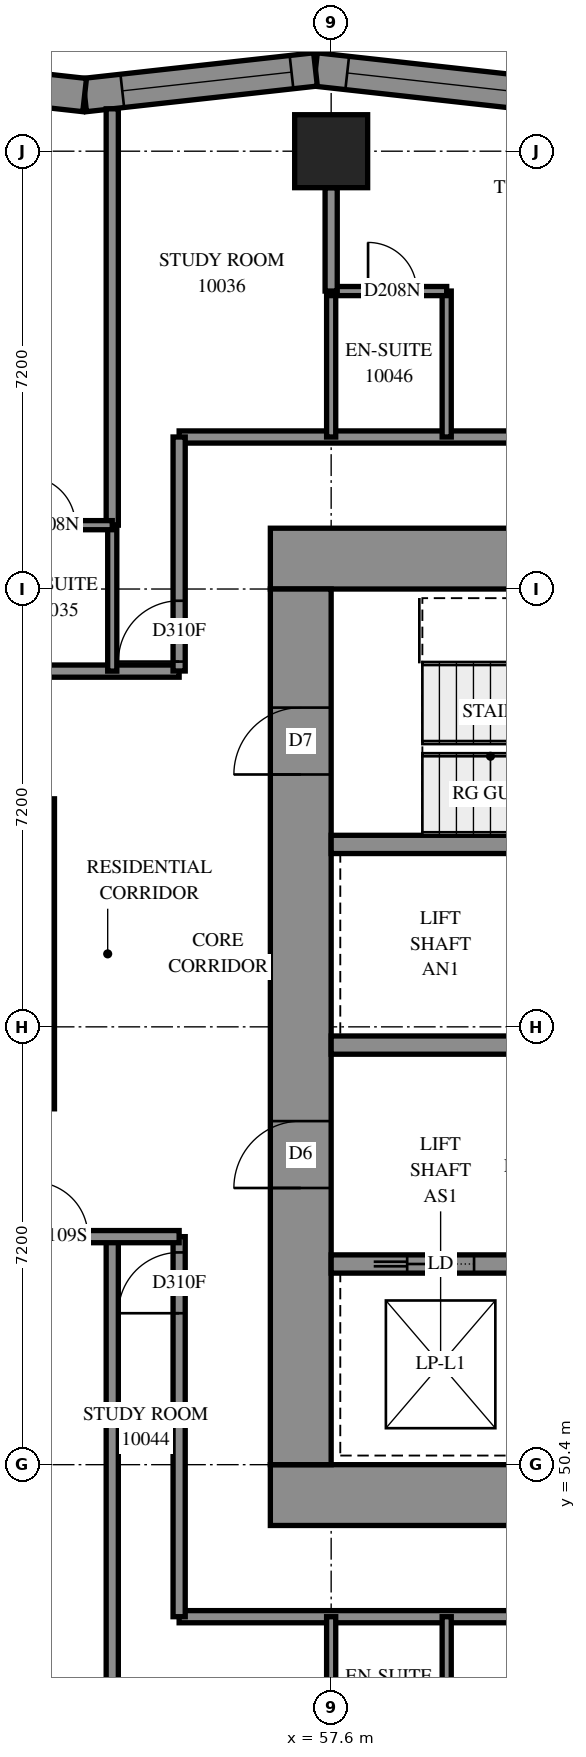
"""IFC4 building model, lengths in metres.
Left out: names, types, materials, properties, quantities, classifications, styles, units other than length and angle.
Written with IfcOpenShell. Run it as: python <this file> out.ifc"""

import sys

from ifc_helpers import new_model, si_unit, direction, frame, frame_2d, origin, origin_2d, place, context, subcontext, project, spatial, polyline, rectangle, outline, extrude, element, fill, save


model = new_model("IFC4")
c1 = context("Model", 3, precision=1e-05, world=origin(), true_north=direction((0.0, 1.0)))
c2 = subcontext(c1, "Body", "Model", "MODEL_VIEW")
j1 = project(units=[si_unit("LENGTHUNIT", "METRE"), si_unit("PLANEANGLEUNIT", "RADIAN")], contexts=[c1])
p1 = place(None, origin())
s1 = spatial("IfcSite", under=j1, at=p1, CompositionType="ELEMENT")
p2 = place(p1, origin())
s2 = spatial("IfcBuilding", under=s1, at=p2, CompositionType="ELEMENT")
p3 = place(p2, frame((0.0, 0.0, 40.6)))
s3 = spatial("IfcBuildingStorey", under=s2, at=p3, CompositionType="ELEMENT", Elevation=40.6)
p4 = place(p3, frame((57.6, 72.0, 0.0), z_axis=(0.0, 0.0, 1.0), x_axis=(1.0, 0.0, 0.0)))
e1 = element("IfcColumn", 1, at=p4, inside=s3, PredefinedType="COLUMN", context=c2, shape_type="SweptSolid", body=[
    extrude(rectangle(XDim=1.2, YDim=1.2, at=origin_2d()), origin(), (0.0, 0.0, 1.0), 3.1),
])
p5 = place(p3, frame((56.6, 49.9, -0.3), z_axis=(0.0, 0.0, 1.0), x_axis=(1.0, 0.0, 0.0)))
e2 = element("IfcWall", 2, at=p5, inside=s3, PredefinedType="SHEAR", context=c2, shape_type="SweptSolid", body=[
    extrude(rectangle(XDim=16.4, YDim=1.0, at=frame_2d((8.2, 0.0))), origin(), (0.0, 0.0, 1.0), 2.7),
])
p6 = place(p3, frame((56.6, 65.3, -0.3), z_axis=(0.0, 0.0, 1.0), x_axis=(1.0, 0.0, 0.0)))
e3 = element("IfcWall", 3, at=p6, inside=s3, PredefinedType="SHEAR", context=c2, shape_type="SweptSolid", body=[
    extrude(rectangle(XDim=16.4, YDim=1.0, at=frame_2d((8.2, 0.0))), origin(), (0.0, 0.0, 1.0), 2.7),
])
p7 = place(p6, frame((11.0, 0.0, 0.3)))
e4 = element("IfcOpeningElement", 4, at=p7, cuts=e3, PredefinedType="OPENING", context=c2, shape_type="SweptSolid", body=[
    extrude(rectangle(XDim=0.8, YDim=2.1, at=frame_2d((0.4, 1.05))), frame((0.0, 0.51, 0.0), z_axis=(0.0, -1.0, 0.0), x_axis=(1.0, 0.0, 0.0)), (0.0, 0.0, 1.0), 1.02),
])
p8 = place(p3, frame((57.1, 50.4, -0.3), z_axis=(0.0, 0.0, 1.0), x_axis=(0.0, 1.0, 0.0)))
e5 = element("IfcWall", 5, at=p8, inside=s3, PredefinedType="SHEAR", context=c2, shape_type="SweptSolid", body=[
    extrude(rectangle(XDim=14.4, YDim=1.0, at=frame_2d((7.2, 0.0))), origin(), (0.0, 0.0, 1.0), 2.7),
])
p9 = place(p8, frame((4.55, 0.0, 0.3)))
e6 = element("IfcOpeningElement", 6, at=p9, cuts=e5, PredefinedType="OPENING", context=c2, shape_type="SweptSolid", body=[
    extrude(rectangle(XDim=1.1, YDim=2.1, at=frame_2d((0.55, 1.05))), frame((0.0, 0.51, 0.0), z_axis=(0.0, -1.0, 0.0), x_axis=(1.0, 0.0, 0.0)), (0.0, 0.0, 1.0), 1.02),
])
p10 = place(p8, frame((11.35, 0.0, 0.3)))
e7 = element("IfcOpeningElement", 7, at=p10, cuts=e5, PredefinedType="OPENING", context=c2, shape_type="SweptSolid", body=[
    extrude(rectangle(XDim=1.1, YDim=2.1, at=frame_2d((0.55, 1.05))), frame((0.0, 0.51, 0.0), z_axis=(0.0, -1.0, 0.0), x_axis=(1.0, 0.0, 0.0)), (0.0, 0.0, 1.0), 1.02),
])
p11 = place(p3, frame((57.6, 53.7, 0.0), z_axis=(0.0, 0.0, 1.0), x_axis=(1.0, 0.0, 0.0)))
e8 = element("IfcWall", 8, at=p11, inside=s3, PredefinedType="SOLIDWALL", context=c2, shape_type="SweptSolid", body=[
    extrude(rectangle(XDim=14.4, YDim=0.3, at=frame_2d((7.2, 0.0))), origin(), (0.0, 0.0, 1.0), 3.1),
])
p12 = place(p11, frame((1.25, 0.0, 0.0)))
e9 = element("IfcOpeningElement", 9, at=p12, cuts=e8, PredefinedType="OPENING", context=c2, shape_type="SweptSolid", body=[
    extrude(rectangle(XDim=1.1, YDim=2.1, at=frame_2d((0.55, 1.05))), frame((0.0, 0.16, 0.0), z_axis=(0.0, -1.0, 0.0), x_axis=(1.0, 0.0, 0.0)), (0.0, 0.0, 1.0), 0.32),
])
p13 = place(p11, frame((4.85, 0.0, 0.0)))
e10 = element("IfcOpeningElement", 10, at=p13, cuts=e8, PredefinedType="OPENING", context=c2, shape_type="SweptSolid", body=[
    extrude(rectangle(XDim=1.1, YDim=2.1, at=frame_2d((0.55, 1.05))), frame((0.0, 0.16, 0.0), z_axis=(0.0, -1.0, 0.0), x_axis=(1.0, 0.0, 0.0)), (0.0, 0.0, 1.0), 0.32),
])
p14 = place(p11, frame((8.45, 0.0, 0.0)))
e11 = element("IfcOpeningElement", 11, at=p14, cuts=e8, PredefinedType="OPENING", context=c2, shape_type="SweptSolid", body=[
    extrude(rectangle(XDim=1.1, YDim=2.1, at=frame_2d((0.55, 1.05))), frame((0.0, 0.16, 0.0), z_axis=(0.0, -1.0, 0.0), x_axis=(1.0, 0.0, 0.0)), (0.0, 0.0, 1.0), 0.32),
])
p15 = place(p11, frame((12.05, 0.0, 0.0)))
e12 = element("IfcOpeningElement", 12, at=p15, cuts=e8, PredefinedType="OPENING", context=c2, shape_type="SweptSolid", body=[
    extrude(rectangle(XDim=1.1, YDim=2.1, at=frame_2d((0.55, 1.05))), frame((0.0, 0.16, 0.0), z_axis=(0.0, -1.0, 0.0), x_axis=(1.0, 0.0, 0.0)), (0.0, 0.0, 1.0), 0.32),
])
p16 = place(p3, frame((57.6, 57.3, 0.0), z_axis=(0.0, 0.0, 1.0), x_axis=(1.0, 0.0, 0.0)))
e13 = element("IfcWall", 13, at=p16, inside=s3, PredefinedType="SOLIDWALL", context=c2, shape_type="SweptSolid", body=[
    extrude(rectangle(XDim=14.4, YDim=0.3, at=frame_2d((7.2, 0.0))), origin(), (0.0, 0.0, 1.0), 3.1),
])
p17 = place(p16, frame((12.05, 0.0, 0.0)))
e14 = element("IfcOpeningElement", 14, at=p17, cuts=e13, PredefinedType="OPENING", context=c2, shape_type="SweptSolid", body=[
    extrude(rectangle(XDim=1.1, YDim=2.1, at=frame_2d((0.55, 1.05))), frame((0.0, 0.16, 0.0), z_axis=(0.0, -1.0, 0.0), x_axis=(1.0, 0.0, 0.0)), (0.0, 0.0, 1.0), 0.32),
])
p18 = place(p3, frame((57.6, 60.6, 0.0), z_axis=(0.0, 0.0, 1.0), x_axis=(1.0, 0.0, 0.0)))
e15 = element("IfcWall", 15, at=p18, inside=s3, PredefinedType="SOLIDWALL", context=c2, shape_type="SweptSolid", body=[
    extrude(rectangle(XDim=7.2, YDim=0.3, at=frame_2d((3.6, 0.0))), origin(), (0.0, 0.0, 1.0), 3.1),
])
p19 = place(p3, frame((61.138, 72.923, 0.0), z_axis=(0.0, 0.0, 1.0), x_axis=(-0.99390702, 0.1102217568, 0.0)))
e16 = element("IfcWall", 16, at=p19, inside=s3, PredefinedType="SOLIDWALL", context=c2, shape_type="SweptSolid", body=[
    extrude(outline(polyline([(0.03, -0.275), (3.85, -0.275), (3.789, 0.275), (-0.03, 0.275), (0.03, -0.275)])), origin(), (0.0, 0.0, 1.0), 3.1),
])
p20 = place(p19, frame((0.494, 0.0, 0.5)))
e17 = element("IfcOpeningElement", 17, at=p20, cuts=e16, PredefinedType="OPENING", context=c2, shape_type="SweptSolid", body=[
    extrude(rectangle(XDim=2.8, YDim=2.45, at=frame_2d((1.4, 1.225))), frame((0.0, 0.285, 0.0), z_axis=(0.0, -1.0, 0.0), x_axis=(1.0, 0.0, 0.0)), (0.0, 0.0, 1.0), 0.57),
])
p21 = place(p3, frame((57.342, 73.344, 0.0), z_axis=(0.0, 0.0, 1.0), x_axis=(-0.99390702, -0.1102217568, 0.0)))
e18 = element("IfcWall", 18, at=p21, inside=s3, PredefinedType="SOLIDWALL", context=c2, shape_type="SweptSolid", body=[
    extrude(outline(polyline([(-0.03, -0.275), (3.789, -0.275), (3.85, 0.275), (0.03, 0.275), (-0.03, -0.275)])), origin(), (0.0, 0.0, 1.0), 3.1),
])
p22 = place(p21, frame((0.397, 0.0, 0.5)))
e19 = element("IfcOpeningElement", 19, at=p22, cuts=e18, PredefinedType="OPENING", context=c2, shape_type="SweptSolid", body=[
    extrude(rectangle(XDim=2.8, YDim=2.45, at=frame_2d((1.4, 1.225))), frame((0.0, 0.285, 0.0), z_axis=(0.0, -1.0, 0.0), x_axis=(1.0, 0.0, 0.0)), (0.0, 0.0, 1.0), 0.57),
])
p23 = place(p3, frame((53.546, 72.923, 0.0), z_axis=(0.0, 0.0, 1.0), x_axis=(-0.99390702, 0.1102217568, 0.0)))
e20 = element("IfcWall", 20, at=p23, inside=s3, PredefinedType="SOLIDWALL", context=c2, shape_type="SweptSolid", body=[
    extrude(outline(polyline([(0.03, -0.275), (3.85, -0.275), (3.789, 0.275), (-0.03, 0.275), (0.03, -0.275)])), origin(), (0.0, 0.0, 1.0), 3.1),
])
p24 = place(p23, frame((1.083, 0.0, 0.5)))
e21 = element("IfcOpeningElement", 21, at=p24, cuts=e20, PredefinedType="OPENING", context=c2, shape_type="SweptSolid", body=[
    extrude(rectangle(XDim=1.2, YDim=2.45, at=frame_2d((0.6, 1.225))), frame((0.0, 0.285, 0.0), z_axis=(0.0, -1.0, 0.0), x_axis=(1.0, 0.0, 0.0)), (0.0, 0.0, 1.0), 0.57),
])
p25 = place(p3, frame((33.452, 63.45, 0.0), z_axis=(0.0, 0.0, 1.0), x_axis=(1.0, 0.0, 0.0)))
e22 = element("IfcWall", 22, at=p25, inside=s3, PredefinedType="PARTITIONING", context=c2, shape_type="SweptSolid", body=[
    extrude(rectangle(XDim=21.648, YDim=0.2, at=frame_2d((10.824, 0.0))), origin(), (0.0, 0.0, 1.0), 3.1),
])
p26 = place(p25, frame((0.142, 0.0, 0.0)))
e23 = element("IfcOpeningElement", 23, at=p26, cuts=e22, PredefinedType="OPENING", context=c2, shape_type="SweptSolid", body=[
    extrude(rectangle(XDim=1.0, YDim=2.1, at=frame_2d((0.5, 1.05))), frame((0.0, 0.11, 0.0), z_axis=(0.0, -1.0, 0.0), x_axis=(1.0, 0.0, 0.0)), (0.0, 0.0, 1.0), 0.22),
])
p27 = place(p25, frame((6.412, 0.0, 0.0)))
e24 = element("IfcOpeningElement", 24, at=p27, cuts=e22, PredefinedType="OPENING", context=c2, shape_type="SweptSolid", body=[
    extrude(rectangle(XDim=0.9, YDim=2.1, at=frame_2d((0.45, 1.05))), frame((0.0, 0.11, 0.0), z_axis=(0.0, -1.0, 0.0), x_axis=(1.0, 0.0, 0.0)), (0.0, 0.0, 1.0), 0.22),
])
p28 = place(p25, frame((14.168, 0.0, 0.0)))
e25 = element("IfcOpeningElement", 25, at=p28, cuts=e22, PredefinedType="OPENING", context=c2, shape_type="SweptSolid", body=[
    extrude(rectangle(XDim=0.9, YDim=2.1, at=frame_2d((0.45, 1.05))), frame((0.0, 0.11, 0.0), z_axis=(0.0, -1.0, 0.0), x_axis=(1.0, 0.0, 0.0)), (0.0, 0.0, 1.0), 0.22),
])
p29 = place(p25, frame((17.651, 0.0, 0.0)))
e26 = element("IfcOpeningElement", 26, at=p29, cuts=e22, PredefinedType="OPENING", context=c2, shape_type="SweptSolid", body=[
    extrude(rectangle(XDim=0.9, YDim=2.1, at=frame_2d((0.45, 1.05))), frame((0.0, 0.11, 0.0), z_axis=(0.0, -1.0, 0.0), x_axis=(1.0, 0.0, 0.0)), (0.0, 0.0, 1.0), 0.22),
])
p30 = place(p3, frame((55.1, 67.3, 0.0), z_axis=(0.0, 0.0, 1.0), x_axis=(1.0, 0.0, 0.0)))
e27 = element("IfcWall", 27, at=p30, inside=s3, PredefinedType="PARTITIONING", context=c2, shape_type="SweptSolid", body=[
    extrude(rectangle(XDim=19.4, YDim=0.2, at=frame_2d((9.7, 0.0))), origin(), (0.0, 0.0, 1.0), 3.1),
])
p31 = place(p30, frame((6.399, 0.0, 0.0)))
e28 = element("IfcOpeningElement", 28, at=p31, cuts=e27, PredefinedType="OPENING", context=c2, shape_type="SweptSolid", body=[
    extrude(rectangle(XDim=0.9, YDim=2.1, at=frame_2d((0.45, 1.05))), frame((0.0, 0.11, 0.0), z_axis=(0.0, -1.0, 0.0), x_axis=(1.0, 0.0, 0.0)), (0.0, 0.0, 1.0), 0.22),
])
p32 = place(p30, frame((13.599, 0.0, 0.0)))
e29 = element("IfcOpeningElement", 29, at=p32, cuts=e27, PredefinedType="OPENING", context=c2, shape_type="SweptSolid", body=[
    extrude(rectangle(XDim=0.9, YDim=2.1, at=frame_2d((0.45, 1.05))), frame((0.0, 0.11, 0.0), z_axis=(0.0, -1.0, 0.0), x_axis=(1.0, 0.0, 0.0)), (0.0, 0.0, 1.0), 0.22),
])
p33 = place(p3, frame((55.1, 47.9, 0.0), z_axis=(0.0, 0.0, 1.0), x_axis=(1.0, 0.0, 0.0)))
e30 = element("IfcWall", 30, at=p33, inside=s3, PredefinedType="PARTITIONING", context=c2, shape_type="SweptSolid", body=[
    extrude(rectangle(XDim=19.204, YDim=0.2, at=frame_2d((9.602, 0.0))), origin(), (0.0, 0.0, 1.0), 3.1),
])
p34 = place(p33, frame((6.399, 0.0, 0.0)))
e31 = element("IfcOpeningElement", 31, at=p34, cuts=e30, PredefinedType="OPENING", context=c2, shape_type="SweptSolid", body=[
    extrude(rectangle(XDim=0.9, YDim=2.1, at=frame_2d((0.45, 1.05))), frame((0.0, 0.11, 0.0), z_axis=(0.0, -1.0, 0.0), x_axis=(1.0, 0.0, 0.0)), (0.0, 0.0, 1.0), 0.22),
])
p35 = place(p33, frame((13.599, 0.0, 0.0)))
e32 = element("IfcOpeningElement", 32, at=p35, cuts=e30, PredefinedType="OPENING", context=c2, shape_type="SweptSolid", body=[
    extrude(rectangle(XDim=0.9, YDim=2.1, at=frame_2d((0.45, 1.05))), frame((0.0, 0.11, 0.0), z_axis=(0.0, -1.0, 0.0), x_axis=(1.0, 0.0, 0.0)), (0.0, 0.0, 1.0), 0.22),
])
p36 = place(p3, frame((54.0, 42.384, 0.0), z_axis=(0.0, 0.0, 1.0), x_axis=(0.0, 1.0, 0.0)))
e33 = element("IfcWall", 33, at=p36, inside=s3, PredefinedType="PARTITIONING", context=c2, shape_type="SweptSolid", body=[
    extrude(rectangle(XDim=11.766, YDim=0.2, at=frame_2d((5.883, 0.0))), origin(), (0.0, 0.0, 1.0), 3.1),
])
p37 = place(p3, frame((54.0, 65.85, 0.0), z_axis=(0.0, 0.0, 1.0), x_axis=(0.0, 1.0, 0.0)))
e34 = element("IfcWall", 34, at=p37, inside=s3, PredefinedType="PARTITIONING", context=c2, shape_type="SweptSolid", body=[
    extrude(rectangle(XDim=6.847, YDim=0.2, at=frame_2d((3.424, 0.0))), origin(), (0.0, 0.0, 1.0), 3.1),
])
p38 = place(p3, frame((55.1, 47.9, 0.0), z_axis=(0.0, 0.0, 1.0), x_axis=(0.0, 1.0, 0.0)))
e35 = element("IfcWall", 35, at=p38, inside=s3, PredefinedType="PARTITIONING", context=c2, shape_type="SweptSolid", body=[
    extrude(rectangle(XDim=6.25, YDim=0.2, at=frame_2d((3.125, 0.0))), origin(), (0.0, 0.0, 1.0), 3.1),
])
p39 = place(p38, frame((4.99, 0.0, 0.0)))
e36 = element("IfcOpeningElement", 36, at=p39, cuts=e35, PredefinedType="OPENING", context=c2, shape_type="SweptSolid", body=[
    extrude(rectangle(XDim=1.0, YDim=2.1, at=frame_2d((0.5, 1.05))), frame((0.0, 0.11, 0.0), z_axis=(0.0, -1.0, 0.0), x_axis=(1.0, 0.0, 0.0)), (0.0, 0.0, 1.0), 0.22),
])
p40 = place(p3, frame((52.95, 56.252, 0.0), z_axis=(0.0, 0.0, 1.0), x_axis=(0.0, 1.0, 0.0)))
e37 = element("IfcWall", 37, at=p40, inside=s3, PredefinedType="PARTITIONING", context=c2, shape_type="SweptSolid", body=[
    extrude(rectangle(XDim=5.098, YDim=0.2, at=frame_2d((2.549, 0.0))), origin(), (0.0, 0.0, 1.0), 3.1),
])
p41 = place(p3, frame((50.4, 54.15, 0.0), z_axis=(0.0, 0.0, 1.0), x_axis=(1.0, 0.0, 0.0)))
e38 = element("IfcWall", 38, at=p41, inside=s3, PredefinedType="PARTITIONING", context=c2, shape_type="SweptSolid", body=[
    extrude(rectangle(XDim=4.7, YDim=0.2, at=frame_2d((2.35, 0.0))), origin(), (0.0, 0.0, 1.0), 3.1),
])
p42 = place(p41, frame((2.3, 0.0, 0.0)))
e39 = element("IfcOpeningElement", 39, at=p42, cuts=e38, PredefinedType="OPENING", context=c2, shape_type="SweptSolid", body=[
    extrude(rectangle(XDim=0.9, YDim=2.1, at=frame_2d((0.45, 1.05))), frame((0.0, 0.11, 0.0), z_axis=(0.0, -1.0, 0.0), x_axis=(1.0, 0.0, 0.0)), (0.0, 0.0, 1.0), 0.22),
])
p43 = place(p3, frame((55.1, 63.452, 0.0), z_axis=(0.0, 0.0, 1.0), x_axis=(0.0, 1.0, 0.0)))
e40 = element("IfcWall", 40, at=p43, inside=s3, PredefinedType="PARTITIONING", context=c2, shape_type="SweptSolid", body=[
    extrude(rectangle(XDim=3.848, YDim=0.2, at=frame_2d((1.924, 0.0))), origin(), (0.0, 0.0, 1.0), 3.1),
])
p44 = place(p43, frame((0.155, 0.0, 0.0)))
e41 = element("IfcOpeningElement", 41, at=p44, cuts=e40, PredefinedType="OPENING", context=c2, shape_type="SweptSolid", body=[
    extrude(rectangle(XDim=1.0, YDim=2.1, at=frame_2d((0.5, 1.05))), frame((0.0, 0.11, 0.0), z_axis=(0.0, -1.0, 0.0), x_axis=(1.0, 0.0, 0.0)), (0.0, 0.0, 1.0), 0.22),
])
for number, where, z_axis, x_axis in (
    (42, (59.5, 67.3, 0.0), (0.0, 0.0, 1.0), (0.0, 1.0, 0.0)),
    (43, (57.6, 67.3, 0.0), (0.0, 0.0, 1.0), (0.0, 1.0, 0.0)),
    (44, (59.5, 45.5, 0.0), (0.0, 0.0, 1.0), (0.0, 1.0, 0.0)),
    (45, (57.6, 45.5, 0.0), (0.0, 0.0, 1.0), (0.0, 1.0, 0.0)),
    (46, (54.0, 63.45, 0.0), (0.0, 0.0, 1.0), (0.0, 1.0, 0.0)),
):
    element("IfcWall", number, at=place(p3, frame(where, z_axis=z_axis, x_axis=x_axis)), inside=s3, PredefinedType="PARTITIONING", context=c2, shape_type="SweptSolid", body=[
        extrude(rectangle(XDim=2.4, YDim=0.15, at=frame_2d((1.2, 0.0))), origin(), (0.0, 0.0, 1.0), 3.1),
    ])
p45 = place(p3, frame((52.1, 65.85, 0.0), z_axis=(0.0, 0.0, 1.0), x_axis=(1.0, 0.0, 0.0)))
e47 = element("IfcWall", 47, at=p45, inside=s3, PredefinedType="PARTITIONING", context=c2, shape_type="SweptSolid", body=[
    extrude(rectangle(XDim=1.9, YDim=0.15, at=frame_2d((0.95, 0.0))), origin(), (0.0, 0.0, 1.0), 3.1),
])
p46 = place(p45, frame((0.493, 0.0, 0.0)))
e48 = element("IfcOpeningElement", 48, at=p46, cuts=e47, PredefinedType="OPENING", context=c2, shape_type="SweptSolid", body=[
    extrude(rectangle(XDim=0.8, YDim=2.1, at=frame_2d((0.4, 1.05))), frame((0.0, 0.085, 0.0), z_axis=(0.0, -1.0, 0.0), x_axis=(1.0, 0.0, 0.0)), (0.0, 0.0, 1.0), 0.17),
])
p47 = place(p3, frame((57.6, 69.7, 0.0), z_axis=(0.0, 0.0, 1.0), x_axis=(1.0, 0.0, 0.0)))
e49 = element("IfcWall", 49, at=p47, inside=s3, PredefinedType="PARTITIONING", context=c2, shape_type="SweptSolid", body=[
    extrude(rectangle(XDim=1.9, YDim=0.15, at=frame_2d((0.95, 0.0))), origin(), (0.0, 0.0, 1.0), 3.1),
])
p48 = place(p47, frame((0.607, 0.0, 0.0)))
e50 = element("IfcOpeningElement", 50, at=p48, cuts=e49, PredefinedType="OPENING", context=c2, shape_type="SweptSolid", body=[
    extrude(rectangle(XDim=0.8, YDim=2.1, at=frame_2d((0.4, 1.05))), frame((0.0, 0.085, 0.0), z_axis=(0.0, -1.0, 0.0), x_axis=(1.0, 0.0, 0.0)), (0.0, 0.0, 1.0), 0.17),
])
p49 = place(p3, frame((57.6, 69.7, 0.0), z_axis=(0.0, 0.0, 1.0), x_axis=(0.0, 1.0, 0.0)))
e51 = element("IfcWall", 51, at=p49, inside=s3, PredefinedType="PARTITIONING", context=c2, shape_type="SweptSolid", body=[
    extrude(rectangle(XDim=1.7, YDim=0.2, at=frame_2d((0.85, 0.0))), origin(), (0.0, 0.0, 1.0), 3.1),
])
p50 = place(p20, origin())
e52 = element("IfcWindow", 52, at=p50, inside=s3, PartitioningType="SINGLE_PANEL", PredefinedType="WINDOW", context=c2, shape_type="SweptSolid", body=[
    extrude(rectangle(XDim=2.8, YDim=2.45, at=frame_2d((1.4, 1.225))), frame((0.0, 0.155, 0.0), z_axis=(0.0, -1.0, 0.0), x_axis=(1.0, 0.0, 0.0)), (0.0, 0.0, 1.0), 0.06),
])
fill(e17, e52)
p51 = place(p22, origin())
e53 = element("IfcWindow", 53, at=p51, inside=s3, PartitioningType="SINGLE_PANEL", PredefinedType="WINDOW", context=c2, shape_type="SweptSolid", body=[
    extrude(rectangle(XDim=2.8, YDim=2.45, at=frame_2d((1.4, 1.225))), frame((0.0, 0.155, 0.0), z_axis=(0.0, -1.0, 0.0), x_axis=(1.0, 0.0, 0.0)), (0.0, 0.0, 1.0), 0.06),
])
fill(e19, e53)
p52 = place(p9, origin())
e54 = element("IfcDoor", 54, at=p52, inside=s3, OperationType="DOUBLE_DOOR_SINGLE_SWING", PredefinedType="DOOR", context=c2, shape_type="SweptSolid", body=[
    extrude(rectangle(XDim=1.1, YDim=2.1, at=frame_2d((0.55, 1.05))), frame((0.0, 0.025, 0.0), z_axis=(0.0, -1.0, 0.0), x_axis=(1.0, 0.0, 0.0)), (0.0, 0.0, 1.0), 0.05),
])
fill(e6, e54)
p53 = place(p10, origin())
e55 = element("IfcDoor", 55, at=p53, inside=s3, OperationType="SINGLE_SWING_LEFT", PredefinedType="DOOR", context=c2, shape_type="SweptSolid", body=[
    extrude(rectangle(XDim=1.1, YDim=2.1, at=frame_2d((0.55, 1.05))), frame((0.0, 0.025, 0.0), z_axis=(0.0, -1.0, 0.0), x_axis=(1.0, 0.0, 0.0)), (0.0, 0.0, 1.0), 0.05),
])
fill(e7, e55)
p54 = place(p12, origin())
e56 = element("IfcDoor", 56, at=p54, inside=s3, OperationType="SLIDING_TO_LEFT", PredefinedType="DOOR", context=c2, shape_type="SweptSolid", body=[
    extrude(rectangle(XDim=1.1, YDim=2.1, at=frame_2d((0.55, 1.05))), frame((0.0, 0.025, 0.0), z_axis=(0.0, -1.0, 0.0), x_axis=(1.0, 0.0, 0.0)), (0.0, 0.0, 1.0), 0.05),
])
fill(e9, e56)
p55 = place(p46, origin())
e57 = element("IfcDoor", 57, at=p55, inside=s3, OperationType="SINGLE_SWING_RIGHT", PredefinedType="DOOR", context=c2, shape_type="SweptSolid", body=[
    extrude(rectangle(XDim=0.8, YDim=2.1, at=frame_2d((0.4, 1.05))), frame((0.0, 0.025, 0.0), z_axis=(0.0, -1.0, 0.0), x_axis=(1.0, 0.0, 0.0)), (0.0, 0.0, 1.0), 0.05),
])
fill(e48, e57)
p56 = place(p44, origin())
e58 = element("IfcDoor", 58, at=p56, inside=s3, OperationType="SINGLE_SWING_LEFT", PredefinedType="DOOR", context=c2, shape_type="SweptSolid", body=[
    extrude(rectangle(XDim=1.0, YDim=2.1, at=frame_2d((0.5, 1.05))), frame((0.0, 0.025, 0.0), z_axis=(0.0, -1.0, 0.0), x_axis=(1.0, 0.0, 0.0)), (0.0, 0.0, 1.0), 0.05),
])
fill(e41, e58)
p57 = place(p42, origin())
e59 = element("IfcDoor", 59, at=p57, inside=s3, OperationType="SINGLE_SWING_LEFT", PredefinedType="DOOR", context=c2, shape_type="SweptSolid", body=[
    extrude(rectangle(XDim=0.9, YDim=2.1, at=frame_2d((0.45, 1.05))), frame((0.0, 0.025, 0.0), z_axis=(0.0, -1.0, 0.0), x_axis=(1.0, 0.0, 0.0)), (0.0, 0.0, 1.0), 0.05),
])
fill(e39, e59)
p58 = place(p39, origin())
e60 = element("IfcDoor", 60, at=p58, inside=s3, OperationType="SINGLE_SWING_RIGHT", PredefinedType="DOOR", context=c2, shape_type="SweptSolid", body=[
    extrude(rectangle(XDim=1.0, YDim=2.1, at=frame_2d((0.5, 1.05))), frame((0.0, 0.025, 0.0), z_axis=(0.0, -1.0, 0.0), x_axis=(1.0, 0.0, 0.0)), (0.0, 0.0, 1.0), 0.05),
])
fill(e36, e60)
p59 = place(p48, origin())
e61 = element("IfcDoor", 61, at=p59, inside=s3, OperationType="SINGLE_SWING_RIGHT", PredefinedType="DOOR", context=c2, shape_type="SweptSolid", body=[
    extrude(rectangle(XDim=0.8, YDim=2.1, at=frame_2d((0.4, 1.05))), frame((0.0, 0.025, 0.0), z_axis=(0.0, -1.0, 0.0), x_axis=(1.0, 0.0, 0.0)), (0.0, 0.0, 1.0), 0.05),
])
fill(e50, e61)
save(model, sys.argv[1])
